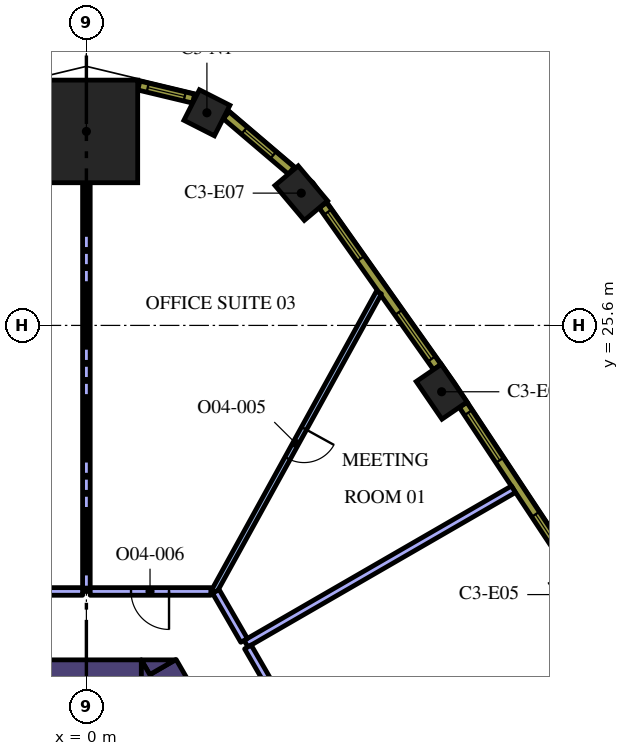
"""IFC4 building model, lengths in metres.
Left out: names, types, materials, properties, quantities, classifications, styles, units other than length and angle.
Written with IfcOpenShell. Run it as: python <this file> out.ifc"""

import sys

from ifc_helpers import new_model, si_unit, direction, frame, frame_2d, origin, origin_2d, place, context, subcontext, project, spatial, polyline, rectangle, outline, extrude, element, fill, save


model = new_model("IFC4")
c1 = context("Model", 3, precision=1e-05, world=origin(), true_north=direction((0.0, 1.0)))
c2 = subcontext(c1, "Body", "Model", "MODEL_VIEW")
j1 = project(units=[si_unit("LENGTHUNIT", "METRE"), si_unit("PLANEANGLEUNIT", "RADIAN")], contexts=[c1])
p1 = place(None, origin())
s1 = spatial("IfcSite", under=j1, at=p1, CompositionType="ELEMENT")
p2 = place(p1, origin())
s2 = spatial("IfcBuilding", under=s1, at=p2, CompositionType="ELEMENT")
p3 = place(p2, frame((0.0, 0.0, 183.6)))
s3 = spatial("IfcBuildingStorey", under=s2, at=p3, CompositionType="ELEMENT", Elevation=183.6)
p4 = place(p3, frame((0.0, 30.704, 0.0), z_axis=(0.0, 0.0, 1.0), x_axis=(0.0, 1.0, 0.0)))
e1 = element("IfcColumn", 1, at=p4, inside=s3, PredefinedType="COLUMN", context=c2, shape_type="SweptSolid", body=[
    extrude(rectangle(XDim=2.7, YDim=2.7, at=origin_2d()), origin(), (0.0, 0.0, 1.0), 4.2),
])
for number, where, z_axis, x_axis in (
    (2, (9.348, 23.854, 0.0), (0.0, 0.0, 1.0), (-0.565, 0.825, 0.0)),
    (3, (5.654, 29.081, 0.0), (0.0, 0.0, 1.0), (-0.644, 0.765, 0.0)),
):
    element("IfcColumn", number, at=place(p3, frame(where, z_axis=z_axis, x_axis=x_axis)), inside=s3, PredefinedType="COLUMN", context=c2, shape_type="SweptSolid", body=[
        extrude(rectangle(XDim=1.2, YDim=0.8, at=origin_2d()), origin(), (0.0, 0.0, 1.0), 4.2),
    ])
p5 = place(p3, frame((3.171, 31.195, 0.0), z_axis=(0.0, 0.0, 1.0), x_axis=(-0.891486197647, 0.453047855535, 0.0)))
e4 = element("IfcColumn", 4, at=p5, inside=s3, PredefinedType="COLUMN", context=c2, shape_type="SweptSolid", body=[
    extrude(rectangle(XDim=0.9, YDim=0.9, at=origin_2d()), origin(), (0.0, 0.0, 1.0), 4.2),
])
p6 = place(p3, frame((5.549, 10.489, 0.0), z_axis=(0.0, 0.0, 1.0), x_axis=(-0.50001746176, 0.866015321998, 0.0)))
e5 = element("IfcWall", 5, at=p6, inside=s3, PredefinedType="SOLIDWALL", context=c2, shape_type="SweptSolid", body=[
    extrude(rectangle(XDim=7.068, YDim=0.8, at=frame_2d((3.534, 0.0))), origin(), (0.0, 0.0, 1.0), 4.2),
])
p7 = place(p3, origin())
e6 = element("IfcWall", 6, at=p7, inside=s3, PredefinedType="SOLIDWALL", context=c2, shape_type="SweptSolid", body=[
    extrude(outline(polyline([(1.443, 16.8), (2.339, 16.8), (1.667, 16.412), (1.443, 16.8)])), origin(), (0.0, 0.0, 1.0), 4.2),
])
p8 = place(p3, frame((-2.379, 16.4, 0.0), z_axis=(0.0, 0.0, 1.0), x_axis=(1.0, 0.0, 0.0)))
e7 = element("IfcWall", 7, at=p8, inside=s3, PredefinedType="SOLIDWALL", context=c2, shape_type="SweptSolid", body=[
    extrude(rectangle(XDim=3.824, YDim=0.8, at=frame_2d((1.912, 0.0))), origin(), (0.0, 0.0, 1.0), 4.2),
])
e8 = element("IfcWall", 8, at=p7, inside=s3, PredefinedType="SOLIDWALL", context=c2, shape_type="SweptSolid", body=[
    extrude(outline(polyline([(1.905, 16.0), (1.447, 16.0), (1.447, 16.793), (1.905, 16.0)])), origin(), (0.0, 0.0, 1.0), 4.2),
])
p9 = place(p3, frame((4.2, 17.226, 0.0), z_axis=(0.0, 0.0, 1.0), x_axis=(0.866021486214, 0.500006785369, 0.0)))
e9 = element("IfcWall", 9, at=p9, inside=s3, PredefinedType="PARTITIONING", context=c2, shape_type="SweptSolid", body=[
    extrude(rectangle(XDim=8.126, YDim=0.2, at=frame_2d((4.063, 0.0))), origin(), (0.0, 0.0, 1.0), 3.15),
])
p10 = place(p3, frame((8.844, 9.182, 0.0), z_axis=(0.0, 0.0, 1.0), x_axis=(-0.50000000053, 0.866025403479, 0.0)))
e10 = element("IfcWall", 10, at=p10, inside=s3, PredefinedType="PARTITIONING", context=c2, shape_type="SweptSolid", body=[
    extrude(rectangle(XDim=9.188, YDim=0.2, at=frame_2d((4.594, 0.0))), origin(), (0.0, 0.0, 1.0), 3.15),
])
p11 = place(p10, frame((4.1, 0.0, 0.0)))
e11 = element("IfcOpeningElement", 11, at=p11, cuts=e10, PredefinedType="OPENING", context=c2, shape_type="SweptSolid", body=[
    extrude(rectangle(XDim=1.0, YDim=2.1, at=frame_2d((0.5, 1.05))), frame((0.0, 0.11, 0.0), z_axis=(0.0, -1.0, 0.0), x_axis=(1.0, 0.0, 0.0)), (0.0, 0.0, 1.0), 0.22),
])
p12 = place(p3, frame((7.698, 26.465, 0.0), z_axis=(0.0, 0.0, 1.0), x_axis=(-0.482998301798, -0.875621288263, 0.0)))
e12 = element("IfcWall", 12, at=p12, inside=s3, PredefinedType="PARTITIONING", context=c2, shape_type="SweptSolid", body=[
    extrude(rectangle(XDim=8.982, YDim=0.15, at=frame_2d((4.491, 0.0))), origin(), (0.0, 0.0, 1.0), 3.15),
])
p13 = place(p12, frame((4.083, 0.0, 0.0)))
e13 = element("IfcOpeningElement", 13, at=p13, cuts=e12, PredefinedType="OPENING", context=c2, shape_type="SweptSolid", body=[
    extrude(rectangle(XDim=0.9, YDim=2.1, at=frame_2d((0.45, 1.05))), frame((0.0, 0.085, 0.0), z_axis=(0.0, -1.0, 0.0), x_axis=(1.0, 0.0, 0.0)), (0.0, 0.0, 1.0), 0.17),
])
p14 = place(p3, frame((4.15, 17.312, 0.0), z_axis=(0.0, 0.0, 1.0), x_axis=(-0.499935638681, 0.86606255962, 0.0)))
e14 = element("IfcWall", 14, at=p14, inside=s3, PredefinedType="PARTITIONING", context=c2, shape_type="SweptSolid", body=[
    extrude(rectangle(XDim=1.487, YDim=0.2, at=frame_2d((0.744, 0.0))), origin(), (0.0, 0.0, 1.0), 3.15),
])
p15 = place(p3, frame((0.0, 18.6, 0.0), z_axis=(0.0, 0.0, 1.0), x_axis=(0.0, 1.0, 0.0)))
e15 = element("IfcWall", 15, at=p15, inside=s3, PredefinedType="PARTITIONING", context=c2, shape_type="SweptSolid", body=[
    extrude(rectangle(XDim=10.754, YDim=0.2, at=frame_2d((5.377, 0.0))), origin(), (0.0, 0.0, 1.0), 3.15),
])
p16 = place(p3, frame((3.274, 18.6, 0.0), z_axis=(0.0, 0.0, 1.0), x_axis=(-1.0, 0.0, 0.0)))
e16 = element("IfcWall", 16, at=p16, inside=s3, PredefinedType="PARTITIONING", context=c2, shape_type="SweptSolid", body=[
    extrude(rectangle(XDim=3.174, YDim=0.2, at=frame_2d((1.587, 0.0))), origin(), (0.0, 0.0, 1.0), 3.15),
])
p17 = place(p16, frame((1.1, 0.0, 0.0)))
e17 = element("IfcOpeningElement", 17, at=p17, cuts=e16, PredefinedType="OPENING", context=c2, shape_type="SweptSolid", body=[
    extrude(rectangle(XDim=1.0, YDim=2.1, at=frame_2d((0.5, 1.05))), frame((0.0, 0.11, 0.0), z_axis=(0.0, -1.0, 0.0), x_axis=(1.0, 0.0, 0.0)), (0.0, 0.0, 1.0), 0.22),
])
p18 = place(p3, frame((-0.1, 18.6, 0.0), z_axis=(0.0, 0.0, 1.0), x_axis=(-1.0, 0.0, 0.0)))
e18 = element("IfcWall", 18, at=p18, inside=s3, PredefinedType="PARTITIONING", context=c2, shape_type="SweptSolid", body=[
    extrude(rectangle(XDim=3.306, YDim=0.2, at=frame_2d((1.653, 0.0))), origin(), (0.0, 0.0, 1.0), 3.15),
])
p19 = place(p3, frame((12.783, 19.171, 0.0), z_axis=(0.0, 0.0, 1.0), x_axis=(-0.551892811511, 0.833915058386, 0.0)))
e19 = element("IfcWall", 19, at=p19, inside=s3, PredefinedType="SOLIDWALL", context=c2, shape_type="SweptSolid", body=[
    extrude(rectangle(XDim=5.204, YDim=0.24, at=frame_2d((2.602, 0.0))), origin(), (0.0, 0.0, 1.0), 3.95),
])
p20 = place(p19, frame((0.248, 0.0, 0.9)))
e20 = element("IfcOpeningElement", 20, at=p20, cuts=e19, PredefinedType="OPENING", context=c2, shape_type="SweptSolid", body=[
    extrude(rectangle(XDim=1.5, YDim=2.55, at=frame_2d((0.75, 1.275))), frame((0.0, 0.13, 0.0), z_axis=(0.0, -1.0, 0.0), x_axis=(1.0, 0.0, 0.0)), (0.0, 0.0, 1.0), 0.26),
])
p21 = place(p19, frame((3.455, 0.0, 0.9)))
e21 = element("IfcOpeningElement", 21, at=p21, cuts=e19, PredefinedType="OPENING", context=c2, shape_type="SweptSolid", body=[
    extrude(rectangle(XDim=1.5, YDim=2.55, at=frame_2d((0.75, 1.275))), frame((0.0, 0.13, 0.0), z_axis=(0.0, -1.0, 0.0), x_axis=(1.0, 0.0, 0.0)), (0.0, 0.0, 1.0), 0.26),
])
p22 = place(p3, frame((9.231, 24.504, 0.0), z_axis=(0.0, 0.0, 1.0), x_axis=(-0.577115207679, 0.816662743772, 0.0)))
e22 = element("IfcWall", 22, at=p22, inside=s3, PredefinedType="SOLIDWALL", context=c2, shape_type="SweptSolid", body=[
    extrude(rectangle(XDim=5.213, YDim=0.24, at=frame_2d((2.606, 0.0))), origin(), (0.0, 0.0, 1.0), 3.95),
])
p23 = place(p22, frame((0.261, 0.0, 0.9)))
e23 = element("IfcOpeningElement", 23, at=p23, cuts=e22, PredefinedType="OPENING", context=c2, shape_type="SweptSolid", body=[
    extrude(rectangle(XDim=1.5, YDim=2.55, at=frame_2d((0.75, 1.275))), frame((0.0, 0.13, 0.0), z_axis=(0.0, -1.0, 0.0), x_axis=(1.0, 0.0, 0.0)), (0.0, 0.0, 1.0), 0.26),
])
p24 = place(p22, frame((3.492, 0.0, 0.9)))
e24 = element("IfcOpeningElement", 24, at=p24, cuts=e22, PredefinedType="OPENING", context=c2, shape_type="SweptSolid", body=[
    extrude(rectangle(XDim=1.5, YDim=2.55, at=frame_2d((0.75, 1.275))), frame((0.0, 0.13, 0.0), z_axis=(0.0, -1.0, 0.0), x_axis=(1.0, 0.0, 0.0)), (0.0, 0.0, 1.0), 0.26),
])
p25 = place(p3, frame((5.392, 29.672, 0.0), z_axis=(0.0, 0.0, 1.0), x_axis=(-0.761419744247, 0.648259186645, 0.0)))
e25 = element("IfcWall", 25, at=p25, inside=s3, PredefinedType="SOLIDWALL", context=c2, shape_type="SweptSolid", body=[
    extrude(rectangle(XDim=2.25, YDim=0.24, at=frame_2d((1.125, 0.0))), origin(), (0.0, 0.0, 1.0), 3.95),
])
p26 = place(p25, frame((0.625, 0.0, 0.9)))
e26 = element("IfcOpeningElement", 26, at=p26, cuts=e25, PredefinedType="OPENING", context=c2, shape_type="SweptSolid", body=[
    extrude(rectangle(XDim=1.0, YDim=2.55, at=frame_2d((0.5, 1.275))), frame((0.0, 0.13, 0.0), z_axis=(0.0, -1.0, 0.0), x_axis=(1.0, 0.0, 0.0)), (0.0, 0.0, 1.0), 0.26),
])
p27 = place(p3, frame((2.821, 31.566, 0.0), z_axis=(0.0, 0.0, 1.0), x_axis=(-0.972479955788, 0.232986556673, 0.0)))
e27 = element("IfcWall", 27, at=p27, inside=s3, PredefinedType="SOLIDWALL", context=c2, shape_type="SweptSolid", body=[
    extrude(rectangle(XDim=1.482, YDim=0.24, at=frame_2d((0.741, 0.0))), origin(), (0.0, 0.0, 1.0), 3.95),
])
p28 = place(p27, frame((0.241, 0.0, 0.9)))
e28 = element("IfcOpeningElement", 28, at=p28, cuts=e27, PredefinedType="OPENING", context=c2, shape_type="SweptSolid", body=[
    extrude(rectangle(XDim=1.0, YDim=2.55, at=frame_2d((0.5, 1.275))), frame((0.0, 0.13, 0.0), z_axis=(0.0, -1.0, 0.0), x_axis=(1.0, 0.0, 0.0)), (0.0, 0.0, 1.0), 0.26),
])
p29 = place(p13, origin())
e29 = element("IfcDoor", 29, at=p29, inside=s3, OperationType="SINGLE_SWING_RIGHT", PredefinedType="DOOR", context=c2, shape_type="SweptSolid", body=[
    extrude(rectangle(XDim=0.9, YDim=2.1, at=frame_2d((0.45, 1.05))), frame((0.0, 0.025, 0.0), z_axis=(0.0, -1.0, 0.0), x_axis=(1.0, 0.0, 0.0)), (0.0, 0.0, 1.0), 0.05),
])
fill(e13, e29)
p30 = place(p17, origin())
e30 = element("IfcDoor", 30, at=p30, inside=s3, OperationType="SINGLE_SWING_RIGHT", PredefinedType="DOOR", context=c2, shape_type="SweptSolid", body=[
    extrude(rectangle(XDim=1.0, YDim=2.1, at=frame_2d((0.5, 1.05))), frame((0.0, 0.025, 0.0), z_axis=(0.0, -1.0, 0.0), x_axis=(1.0, 0.0, 0.0)), (0.0, 0.0, 1.0), 0.05),
])
fill(e17, e30)
p31 = place(p20, origin())
e31 = element("IfcWindow", 31, at=p31, inside=s3, PartitioningType="SINGLE_PANEL", PredefinedType="WINDOW", context=c2, shape_type="SweptSolid", body=[
    extrude(rectangle(XDim=1.5, YDim=2.55, at=frame_2d((0.75, 1.275))), frame((0.0, 0.04, 0.0), z_axis=(0.0, -1.0, 0.0), x_axis=(1.0, 0.0, 0.0)), (0.0, 0.0, 1.0), 0.06),
])
fill(e20, e31)
p32 = place(p21, origin())
e32 = element("IfcWindow", 32, at=p32, inside=s3, PartitioningType="SINGLE_PANEL", PredefinedType="WINDOW", context=c2, shape_type="SweptSolid", body=[
    extrude(rectangle(XDim=1.5, YDim=2.55, at=frame_2d((0.75, 1.275))), frame((0.0, 0.04, 0.0), z_axis=(0.0, -1.0, 0.0), x_axis=(1.0, 0.0, 0.0)), (0.0, 0.0, 1.0), 0.06),
])
fill(e21, e32)
p33 = place(p23, origin())
e33 = element("IfcWindow", 33, at=p33, inside=s3, PartitioningType="SINGLE_PANEL", PredefinedType="WINDOW", context=c2, shape_type="SweptSolid", body=[
    extrude(rectangle(XDim=1.5, YDim=2.55, at=frame_2d((0.75, 1.275))), frame((0.0, 0.04, 0.0), z_axis=(0.0, -1.0, 0.0), x_axis=(1.0, 0.0, 0.0)), (0.0, 0.0, 1.0), 0.06),
])
fill(e23, e33)
p34 = place(p24, origin())
e34 = element("IfcWindow", 34, at=p34, inside=s3, PartitioningType="SINGLE_PANEL", PredefinedType="WINDOW", context=c2, shape_type="SweptSolid", body=[
    extrude(rectangle(XDim=1.5, YDim=2.55, at=frame_2d((0.75, 1.275))), frame((0.0, 0.04, 0.0), z_axis=(0.0, -1.0, 0.0), x_axis=(1.0, 0.0, 0.0)), (0.0, 0.0, 1.0), 0.06),
])
fill(e24, e34)
p35 = place(p26, origin())
e35 = element("IfcWindow", 35, at=p35, inside=s3, PartitioningType="SINGLE_PANEL", PredefinedType="WINDOW", context=c2, shape_type="SweptSolid", body=[
    extrude(rectangle(XDim=1.0, YDim=2.55, at=frame_2d((0.5, 1.275))), frame((0.0, 0.04, 0.0), z_axis=(0.0, -1.0, 0.0), x_axis=(1.0, 0.0, 0.0)), (0.0, 0.0, 1.0), 0.06),
])
fill(e26, e35)
p36 = place(p28, origin())
e36 = element("IfcWindow", 36, at=p36, inside=s3, PartitioningType="SINGLE_PANEL", PredefinedType="WINDOW", context=c2, shape_type="SweptSolid", body=[
    extrude(rectangle(XDim=1.0, YDim=2.55, at=frame_2d((0.5, 1.275))), frame((0.0, 0.04, 0.0), z_axis=(0.0, -1.0, 0.0), x_axis=(1.0, 0.0, 0.0)), (0.0, 0.0, 1.0), 0.06),
])
fill(e28, e36)
save(model, sys.argv[1])
